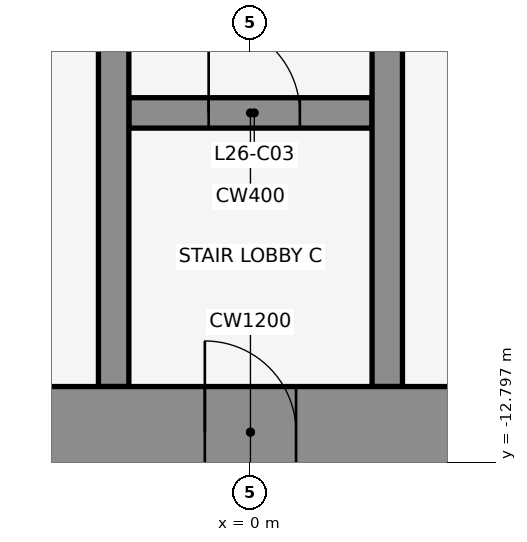
"""IFC4 building model, lengths in metres.
Left out: names, types, materials, properties, quantities, classifications, styles, units other than length and angle.
Written with IfcOpenShell. Run it as: python <this file> out.ifc"""

import sys

from ifc_helpers import new_model, si_unit, direction, frame, frame_2d, origin, place, context, subcontext, project, spatial, rectangle, extrude, element, fill, save


model = new_model("IFC4")
c1 = context("Model", 3, precision=1e-05, world=origin(), true_north=direction((0.0, 1.0)))
c2 = subcontext(c1, "Body", "Model", "MODEL_VIEW")
j1 = project(units=[si_unit("LENGTHUNIT", "METRE"), si_unit("PLANEANGLEUNIT", "RADIAN")], contexts=[c1])
p1 = place(None, origin())
s1 = spatial("IfcSite", under=j1, at=p1, CompositionType="ELEMENT")
p2 = place(p1, origin())
s2 = spatial("IfcBuilding", under=s1, at=p2, CompositionType="ELEMENT")
p3 = place(p2, frame((0.0, 0.0, 122.7)))
s3 = spatial("IfcBuildingStorey", under=s2, at=p3, CompositionType="ELEMENT", Elevation=122.7)
p4 = place(p3, frame((-1.6, -8.2, 0.0), z_axis=(0.0, 0.0, 1.0), x_axis=(1.0, 0.0, 0.0)))
e1 = element("IfcWall", 1, at=p4, inside=s3, PredefinedType="SHEAR", context=c2, shape_type="SweptSolid", body=[
    extrude(rectangle(XDim=3.2, YDim=0.4, at=frame_2d((1.6, 0.0))), origin(), (0.0, 0.0, 1.0), 4.1),
])
p5 = place(p4, frame((1.05, 0.0, 0.0)))
e2 = element("IfcOpeningElement", 2, at=p5, cuts=e1, PredefinedType="OPENING", context=c2, shape_type="SweptSolid", body=[
    extrude(rectangle(XDim=1.2, YDim=2.1, at=frame_2d((0.6, 1.05))), frame((0.0, 0.212, 0.0), z_axis=(0.0, -1.0, 0.0), x_axis=(1.0, 0.0, 0.0)), (0.0, 0.0, 1.0), 0.424),
])
for number, where, z_axis, x_axis in (
    (3, (-1.8, -11.8, 0.0), (0.0, 0.0, 1.0), (0.0, 1.0, 0.0)),
    (4, (1.8, -11.8, 0.0), (0.0, 0.0, 1.0), (0.0, 1.0, 0.0)),
):
    element("IfcWall", number, at=place(p3, frame(where, z_axis=z_axis, x_axis=x_axis)), inside=s3, PredefinedType="SHEAR", context=c2, shape_type="SweptSolid", body=[
        extrude(rectangle(XDim=10.6, YDim=0.4, at=frame_2d((5.3, 0.0))), origin(), (0.0, 0.0, 1.0), 4.1),
    ])
p6 = place(p3, frame((-22.0, -12.4, 0.0), z_axis=(0.0, 0.0, 1.0), x_axis=(1.0, 0.0, 0.0)))
e5 = element("IfcWall", 5, at=p6, inside=s3, PredefinedType="SHEAR", context=c2, shape_type="SweptSolid", body=[
    extrude(rectangle(XDim=44.0, YDim=1.2, at=frame_2d((22.0, 0.0))), origin(), (0.0, 0.0, 1.0), 4.1),
])
p7 = place(p6, frame((2.2, 0.0, 0.0)))
e6 = element("IfcOpeningElement", 6, at=p7, cuts=e5, PredefinedType="OPENING", context=c2, shape_type="SweptSolid", body=[
    extrude(rectangle(XDim=1.2, YDim=2.1, at=frame_2d((0.6, 1.05))), frame((0.0, 0.612, 0.0), z_axis=(0.0, -1.0, 0.0), x_axis=(1.0, 0.0, 0.0)), (0.0, 0.0, 1.0), 1.224),
])
p8 = place(p6, frame((21.4, 0.0, 0.0)))
e7 = element("IfcOpeningElement", 7, at=p8, cuts=e5, PredefinedType="OPENING", context=c2, shape_type="SweptSolid", body=[
    extrude(rectangle(XDim=1.2, YDim=2.1, at=frame_2d((0.6, 1.05))), frame((0.0, 0.612, 0.0), z_axis=(0.0, -1.0, 0.0), x_axis=(1.0, 0.0, 0.0)), (0.0, 0.0, 1.0), 1.224),
])
p9 = place(p6, frame((40.6, 0.0, 0.0)))
e8 = element("IfcOpeningElement", 8, at=p9, cuts=e5, PredefinedType="OPENING", context=c2, shape_type="SweptSolid", body=[
    extrude(rectangle(XDim=1.2, YDim=2.1, at=frame_2d((0.6, 1.05))), frame((0.0, 0.612, 0.0), z_axis=(0.0, -1.0, 0.0), x_axis=(1.0, 0.0, 0.0)), (0.0, 0.0, 1.0), 1.224),
])
p10 = place(p6, frame((16.0, 0.0, 0.0)))
e9 = element("IfcOpeningElement", 9, at=p10, cuts=e5, PredefinedType="OPENING", context=c2, shape_type="SweptSolid", body=[
    extrude(rectangle(XDim=1.8, YDim=2.1, at=frame_2d((0.9, 1.05))), frame((0.0, 0.612, 0.0), z_axis=(0.0, -1.0, 0.0), x_axis=(1.0, 0.0, 0.0)), (0.0, 0.0, 1.0), 1.224),
])
p11 = place(p6, frame((6.3, 0.0, 0.0)))
e10 = element("IfcOpeningElement", 10, at=p11, cuts=e5, PredefinedType="OPENING", context=c2, shape_type="SweptSolid", body=[
    extrude(rectangle(XDim=1.2, YDim=2.1, at=frame_2d((0.6, 1.05))), frame((0.0, 0.612, 0.0), z_axis=(0.0, -1.0, 0.0), x_axis=(1.0, 0.0, 0.0)), (0.0, 0.0, 1.0), 1.224),
])
p12 = place(p6, frame((26.2, 0.0, 0.0)))
e11 = element("IfcOpeningElement", 11, at=p12, cuts=e5, PredefinedType="OPENING", context=c2, shape_type="SweptSolid", body=[
    extrude(rectangle(XDim=1.8, YDim=2.1, at=frame_2d((0.9, 1.05))), frame((0.0, 0.612, 0.0), z_axis=(0.0, -1.0, 0.0), x_axis=(1.0, 0.0, 0.0)), (0.0, 0.0, 1.0), 1.224),
])
p13 = place(p6, frame((36.5, 0.0, 0.0)))
e12 = element("IfcOpeningElement", 12, at=p13, cuts=e5, PredefinedType="OPENING", context=c2, shape_type="SweptSolid", body=[
    extrude(rectangle(XDim=1.2, YDim=2.1, at=frame_2d((0.6, 1.05))), frame((0.0, 0.612, 0.0), z_axis=(0.0, -1.0, 0.0), x_axis=(1.0, 0.0, 0.0)), (0.0, 0.0, 1.0), 1.224),
])
p14 = place(p5, origin())
e13 = element("IfcDoor", 13, at=p14, inside=s3, OperationType="SINGLE_SWING_LEFT", PredefinedType="DOOR", context=c2, shape_type="SweptSolid", body=[
    extrude(rectangle(XDim=1.2, YDim=2.1, at=frame_2d((0.6, 1.05))), frame((0.0, 0.025, 0.0), z_axis=(0.0, -1.0, 0.0), x_axis=(1.0, 0.0, 0.0)), (0.0, 0.0, 1.0), 0.05),
])
fill(e2, e13)
p15 = place(p8, frame((1.2, 0.0, 0.0), z_axis=(0.0, 0.0, 1.0), x_axis=(-1.0, 0.0, 0.0)))
e14 = element("IfcDoor", 14, at=p15, inside=s3, OperationType="SINGLE_SWING_RIGHT", PredefinedType="DOOR", context=c2, shape_type="SweptSolid", body=[
    extrude(rectangle(XDim=1.2, YDim=2.1, at=frame_2d((0.6, 1.05))), frame((0.0, 0.025, 0.0), z_axis=(0.0, -1.0, 0.0), x_axis=(1.0, 0.0, 0.0)), (0.0, 0.0, 1.0), 0.05),
])
fill(e7, e14)
save(model, sys.argv[1])
